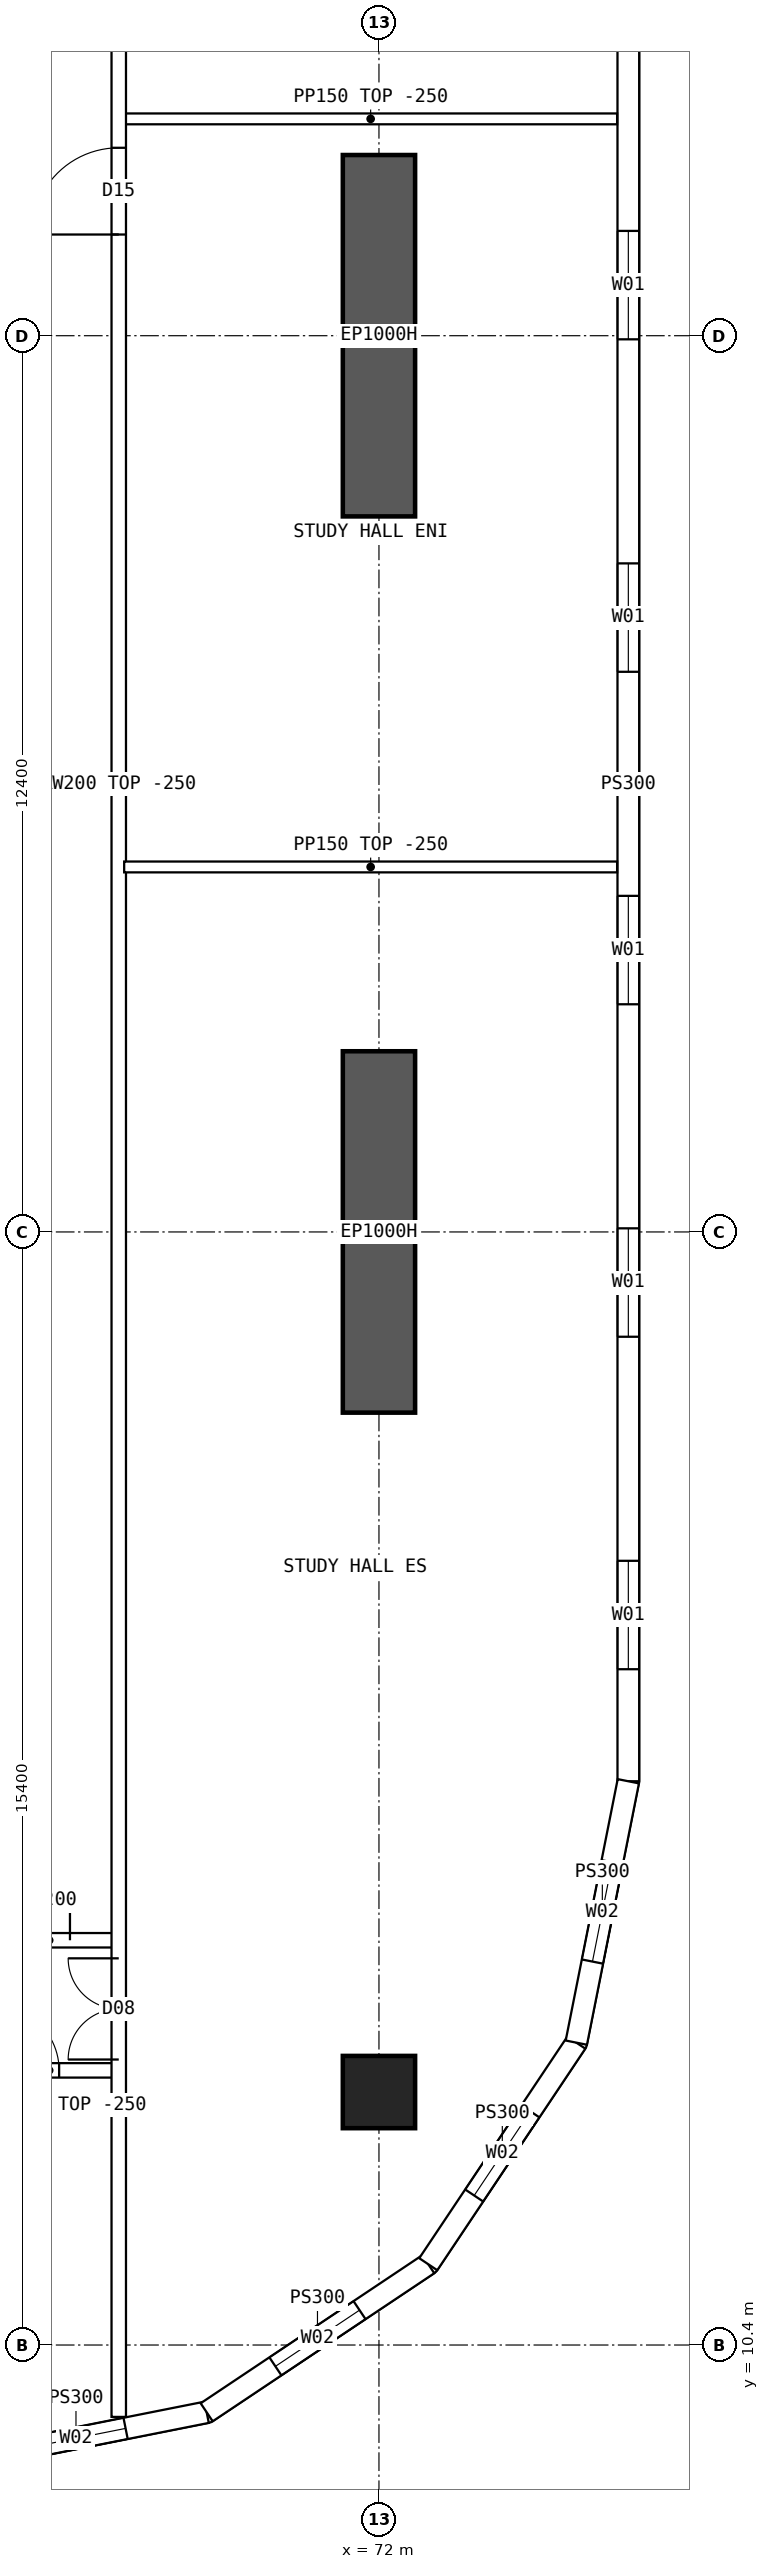
"""IFC4 building model, lengths in metres.
Left out: names, types, materials, properties, quantities, classifications, styles, units other than length and angle.
Written with IfcOpenShell. Run it as: python <this file> out.ifc"""

import sys

from ifc_helpers import new_model, si_unit, direction, frame, frame_2d, origin, origin_2d, place, context, subcontext, project, spatial, polyline, rectangle, hollow_rectangle, outline, extrude, element, fill, save


model = new_model("IFC4")
c1 = context("Model", 3, precision=1e-05, world=origin(), true_north=direction((0.0, 1.0)))
c2 = subcontext(c1, "Body", "Model", "MODEL_VIEW")
j1 = project(units=[si_unit("LENGTHUNIT", "METRE"), si_unit("PLANEANGLEUNIT", "RADIAN")], contexts=[c1])
p1 = place(None, origin())
s1 = spatial("IfcSite", under=j1, at=p1, CompositionType="ELEMENT")
p2 = place(p1, origin())
s2 = spatial("IfcBuilding", under=s1, at=p2, CompositionType="ELEMENT")
p3 = place(p2, frame((0.0, 0.0, 84.4)))
s3 = spatial("IfcBuildingStorey", under=s2, at=p3, CompositionType="ELEMENT", Elevation=84.4)
p4 = place(p3, frame((72.0, 13.9, 0.0), z_axis=(0.0, 0.0, 1.0), x_axis=(1.0, 0.0, 0.0)))
e1 = element("IfcColumn", 1, at=p4, inside=s3, PredefinedType="COLUMN", context=c2, shape_type="SweptSolid", body=[
    extrude(hollow_rectangle(XDim=1.0, YDim=1.0, WallThickness=0.1, at=origin_2d()), origin(), (0.0, 0.0, 1.0), 3.75),
])
for number, where, z_axis, x_axis in (
    (2, (72.0, 23.3, 0.0), (0.0, 0.0, 1.0), (0.0, 1.0, 0.0)),
    (3, (72.0, 35.7, 0.0), (0.0, 0.0, 1.0), (0.0, 1.0, 0.0)),
):
    element("IfcWall", number, at=place(p3, frame(where, z_axis=z_axis, x_axis=x_axis)), inside=s3, PredefinedType="SHEAR", context=c2, shape_type="SweptSolid", body=[
        extrude(rectangle(XDim=5.0, YDim=1.0, at=frame_2d((2.5, 0.0))), origin(), (0.0, 0.0, 1.0), 3.75),
    ])
p5 = place(p3, frame((75.45, 18.2, 0.0), z_axis=(0.0, 0.0, 1.0), x_axis=(0.0, 1.0, 0.0)))
e4 = element("IfcWall", 4, at=p5, inside=s3, PredefinedType="SOLIDWALL", context=c2, shape_type="SweptSolid", body=[
    extrude(outline(polyline([(-0.015, -0.15), (27.615, -0.15), (27.585, 0.15), (0.015, 0.15), (-0.015, -0.15)])), origin(), (0.0, 0.0, 1.0), 3.5),
])
p6 = place(p5, frame((1.55, 0.0, 0.9)))
e5 = element("IfcOpeningElement", 5, at=p6, cuts=e4, PredefinedType="OPENING", context=c2, shape_type="SweptSolid", body=[
    extrude(rectangle(XDim=1.5, YDim=2.0, at=frame_2d((0.75, 1.0))), frame((0.0, 0.16, 0.0), z_axis=(0.0, -1.0, 0.0), x_axis=(1.0, 0.0, 0.0)), (0.0, 0.0, 1.0), 0.32),
])
p7 = place(p5, frame((6.15, 0.0, 0.9)))
e6 = element("IfcOpeningElement", 6, at=p7, cuts=e4, PredefinedType="OPENING", context=c2, shape_type="SweptSolid", body=[
    extrude(rectangle(XDim=1.5, YDim=2.0, at=frame_2d((0.75, 1.0))), frame((0.0, 0.16, 0.0), z_axis=(0.0, -1.0, 0.0), x_axis=(1.0, 0.0, 0.0)), (0.0, 0.0, 1.0), 0.32),
])
p8 = place(p5, frame((10.75, 0.0, 0.9)))
e7 = element("IfcOpeningElement", 7, at=p8, cuts=e4, PredefinedType="OPENING", context=c2, shape_type="SweptSolid", body=[
    extrude(rectangle(XDim=1.5, YDim=2.0, at=frame_2d((0.75, 1.0))), frame((0.0, 0.16, 0.0), z_axis=(0.0, -1.0, 0.0), x_axis=(1.0, 0.0, 0.0)), (0.0, 0.0, 1.0), 0.32),
])
p9 = place(p5, frame((15.35, 0.0, 0.9)))
e8 = element("IfcOpeningElement", 8, at=p9, cuts=e4, PredefinedType="OPENING", context=c2, shape_type="SweptSolid", body=[
    extrude(rectangle(XDim=1.5, YDim=2.0, at=frame_2d((0.75, 1.0))), frame((0.0, 0.16, 0.0), z_axis=(0.0, -1.0, 0.0), x_axis=(1.0, 0.0, 0.0)), (0.0, 0.0, 1.0), 0.32),
])
p10 = place(p5, frame((19.95, 0.0, 0.9)))
e9 = element("IfcOpeningElement", 9, at=p10, cuts=e4, PredefinedType="OPENING", context=c2, shape_type="SweptSolid", body=[
    extrude(rectangle(XDim=1.5, YDim=2.0, at=frame_2d((0.75, 1.0))), frame((0.0, 0.16, 0.0), z_axis=(0.0, -1.0, 0.0), x_axis=(1.0, 0.0, 0.0)), (0.0, 0.0, 1.0), 0.32),
])
p11 = place(p5, frame((24.55, 0.0, 0.9)))
e10 = element("IfcOpeningElement", 10, at=p11, cuts=e4, PredefinedType="OPENING", context=c2, shape_type="SweptSolid", body=[
    extrude(rectangle(XDim=1.5, YDim=2.0, at=frame_2d((0.75, 1.0))), frame((0.0, 0.16, 0.0), z_axis=(0.0, -1.0, 0.0), x_axis=(1.0, 0.0, 0.0)), (0.0, 0.0, 1.0), 0.32),
])
p12 = place(p3, frame((66.0, 8.75, 0.0), z_axis=(0.0, 0.0, 1.0), x_axis=(0.980791473772, 0.195059183267, 0.0)))
e11 = element("IfcWall", 11, at=p12, inside=s3, PredefinedType="SOLIDWALL", context=c2, shape_type="SweptSolid", body=[
    extrude(outline(polyline([(-0.03, -0.15), (3.717, -0.15), (3.657, 0.15), (0.03, 0.15), (-0.03, -0.15)])), origin(), (0.0, 0.0, 1.0), 3.5),
])
p13 = place(p12, frame((1.144, 0.0, 0.9)))
e12 = element("IfcOpeningElement", 12, at=p13, cuts=e11, PredefinedType="OPENING", context=c2, shape_type="SweptSolid", body=[
    extrude(rectangle(XDim=1.4, YDim=1.8, at=frame_2d((0.7, 0.9))), frame((0.0, 0.16, 0.0), z_axis=(0.0, -1.0, 0.0), x_axis=(1.0, 0.0, 0.0)), (0.0, 0.0, 1.0), 0.32),
])
p14 = place(p3, frame((69.616, 9.469, 0.0), z_axis=(0.0, 0.0, 1.0), x_axis=(0.831448786846, 0.555601399253, 0.0)))
e13 = element("IfcWall", 13, at=p14, inside=s3, PredefinedType="SOLIDWALL", context=c2, shape_type="SweptSolid", body=[
    extrude(outline(polyline([(-0.03, -0.15), (3.717, -0.15), (3.657, 0.15), (0.03, 0.15), (-0.03, -0.15)])), origin(), (0.0, 0.0, 1.0), 3.5),
])
p15 = place(p14, frame((1.144, 0.0, 0.9)))
e14 = element("IfcOpeningElement", 14, at=p15, cuts=e13, PredefinedType="OPENING", context=c2, shape_type="SweptSolid", body=[
    extrude(rectangle(XDim=1.4, YDim=1.8, at=frame_2d((0.7, 0.9))), frame((0.0, 0.16, 0.0), z_axis=(0.0, -1.0, 0.0), x_axis=(1.0, 0.0, 0.0)), (0.0, 0.0, 1.0), 0.32),
])
p16 = place(p3, frame((72.682, 11.518, 0.0), z_axis=(0.0, 0.0, 1.0), x_axis=(0.555601399253, 0.831448786846, 0.0)))
e15 = element("IfcWall", 15, at=p16, inside=s3, PredefinedType="SOLIDWALL", context=c2, shape_type="SweptSolid", body=[
    extrude(outline(polyline([(-0.03, -0.15), (3.717, -0.15), (3.657, 0.15), (0.03, 0.15), (-0.03, -0.15)])), origin(), (0.0, 0.0, 1.0), 3.5),
])
p17 = place(p16, frame((1.144, 0.0, 0.9)))
e16 = element("IfcOpeningElement", 16, at=p17, cuts=e15, PredefinedType="OPENING", context=c2, shape_type="SweptSolid", body=[
    extrude(rectangle(XDim=1.4, YDim=1.8, at=frame_2d((0.7, 0.9))), frame((0.0, 0.16, 0.0), z_axis=(0.0, -1.0, 0.0), x_axis=(1.0, 0.0, 0.0)), (0.0, 0.0, 1.0), 0.32),
])
p18 = place(p3, frame((74.731, 14.583, 0.0), z_axis=(0.0, 0.0, 1.0), x_axis=(0.195059183267, 0.980791473772, 0.0)))
e17 = element("IfcWall", 17, at=p18, inside=s3, PredefinedType="SOLIDWALL", context=c2, shape_type="SweptSolid", body=[
    extrude(outline(polyline([(-0.03, -0.15), (3.702, -0.15), (3.672, 0.15), (0.03, 0.15), (-0.03, -0.15)])), origin(), (0.0, 0.0, 1.0), 3.5),
])
p19 = place(p18, frame((1.144, 0.0, 0.9)))
e18 = element("IfcOpeningElement", 18, at=p19, cuts=e17, PredefinedType="OPENING", context=c2, shape_type="SweptSolid", body=[
    extrude(rectangle(XDim=1.4, YDim=1.8, at=frame_2d((0.7, 0.9))), frame((0.0, 0.16, 0.0), z_axis=(0.0, -1.0, 0.0), x_axis=(1.0, 0.0, 0.0)), (0.0, 0.0, 1.0), 0.32),
])
p20 = place(p3, frame((66.475, 14.2, 0.0), z_axis=(0.0, 0.0, 1.0), x_axis=(1.0, 0.0, 0.0)))
e19 = element("IfcWall", 19, at=p20, inside=s3, PredefinedType="SOLIDWALL", context=c2, shape_type="SweptSolid", body=[
    extrude(rectangle(XDim=1.925, YDim=0.2, at=frame_2d((0.962, 0.0))), origin(), (0.0, 0.0, 1.0), 3.5),
])
p21 = place(p20, frame((0.2, 0.0, 0.0)))
e20 = element("IfcOpeningElement", 20, at=p21, cuts=e19, PredefinedType="OPENING", context=c2, shape_type="SweptSolid", body=[
    extrude(rectangle(XDim=0.9, YDim=2.1, at=frame_2d((0.45, 1.05))), frame((0.0, 0.11, 0.0), z_axis=(0.0, -1.0, 0.0), x_axis=(1.0, 0.0, 0.0)), (0.0, 0.0, 1.0), 0.22),
])
p22 = place(p3, frame((66.475, 16.0, 0.0), z_axis=(0.0, 0.0, 1.0), x_axis=(1.0, 0.0, 0.0)))
e21 = element("IfcWall", 21, at=p22, inside=s3, PredefinedType="SOLIDWALL", context=c2, shape_type="SweptSolid", body=[
    extrude(rectangle(XDim=1.925, YDim=0.2, at=frame_2d((0.962, 0.0))), origin(), (0.0, 0.0, 1.0), 3.5),
])
p23 = place(p22, frame((0.05, 0.0, 0.0)))
e22 = element("IfcOpeningElement", 22, at=p23, cuts=e21, PredefinedType="OPENING", context=c2, shape_type="SweptSolid", body=[
    extrude(rectangle(XDim=1.2, YDim=2.1, at=frame_2d((0.6, 1.05))), frame((0.0, 0.11, 0.0), z_axis=(0.0, -1.0, 0.0), x_axis=(1.0, 0.0, 0.0)), (0.0, 0.0, 1.0), 0.22),
])
p24 = place(p3, frame((68.475, 30.85, 0.0), z_axis=(0.0, 0.0, 1.0), x_axis=(1.0, 0.0, 0.0)))
e23 = element("IfcWall", 23, at=p24, inside=s3, PredefinedType="PARTITIONING", context=c2, shape_type="SweptSolid", body=[
    extrude(outline(polyline([(0.0, 0.0), (6.82, 0.0), (6.82, 3.5), (3.827, 3.5), (3.825, 3.05), (3.227, 3.05), (3.225, 3.5), (0.0, 3.5), (0.0, 0.0)])), frame((0.0, 0.075, 0.0), z_axis=(0.0, -1.0, 0.0), x_axis=(1.0, 0.0, 0.0)), (0.0, 0.0, 1.0), 0.15),
])
p25 = place(p3, frame((68.4, 9.405, 0.0), z_axis=(0.0, 0.0, 1.0), x_axis=(0.0, 1.0, 0.0)))
e24 = element("IfcWall", 24, at=p25, inside=s3, PredefinedType="SOLIDWALL", context=c2, shape_type="SweptSolid", body=[
    extrude(rectangle(XDim=45.189, YDim=0.2, at=frame_2d((22.595, 0.0))), origin(), (0.0, 0.0, 1.0), 3.5),
])
p26 = place(p25, frame((30.195, 0.0, 0.0)))
e25 = element("IfcOpeningElement", 25, at=p26, cuts=e24, PredefinedType="OPENING", context=c2, shape_type="SweptSolid", body=[
    extrude(rectangle(XDim=1.2, YDim=2.1, at=frame_2d((0.6, 1.05))), frame((0.0, 0.11, 0.0), z_axis=(0.0, -1.0, 0.0), x_axis=(1.0, 0.0, 0.0)), (0.0, 0.0, 1.0), 0.22),
])
p27 = place(p25, frame((4.945, 0.0, 0.0)))
e26 = element("IfcOpeningElement", 26, at=p27, cuts=e24, PredefinedType="OPENING", context=c2, shape_type="SweptSolid", body=[
    extrude(rectangle(XDim=1.4, YDim=2.1, at=frame_2d((0.7, 1.05))), frame((0.0, 0.11, 0.0), z_axis=(0.0, -1.0, 0.0), x_axis=(1.0, 0.0, 0.0)), (0.0, 0.0, 1.0), 0.22),
])
p28 = place(p25, frame((38.745, 0.0, 0.0)))
e27 = element("IfcOpeningElement", 27, at=p28, cuts=e24, PredefinedType="OPENING", context=c2, shape_type="SweptSolid", body=[
    extrude(rectangle(XDim=1.4, YDim=2.1, at=frame_2d((0.7, 1.05))), frame((0.0, 0.11, 0.0), z_axis=(0.0, -1.0, 0.0), x_axis=(1.0, 0.0, 0.0)), (0.0, 0.0, 1.0), 0.22),
])
p29 = place(p3, frame((68.475, 41.2, 0.0), z_axis=(0.0, 0.0, 1.0), x_axis=(1.0, 0.0, 0.0)))
e28 = element("IfcWall", 28, at=p29, inside=s3, PredefinedType="PARTITIONING", context=c2, shape_type="SweptSolid", body=[
    extrude(outline(polyline([(0.0, 0.0), (6.82, 0.0), (6.82, 3.5), (3.827, 3.5), (3.825, 3.05), (3.227, 3.05), (3.225, 3.5), (0.0, 3.5), (0.0, 0.0)])), frame((0.0, 0.075, 0.0), z_axis=(0.0, -1.0, 0.0), x_axis=(1.0, 0.0, 0.0)), (0.0, 0.0, 1.0), 0.15),
])
p30 = place(p6, origin())
e29 = element("IfcWindow", 29, at=p30, inside=s3, PartitioningType="SINGLE_PANEL", PredefinedType="WINDOW", context=c2, shape_type="SweptSolid", body=[
    extrude(rectangle(XDim=1.5, YDim=2.0, at=frame_2d((0.75, 1.0))), frame((0.0, 0.03, 0.0), z_axis=(0.0, -1.0, 0.0), x_axis=(1.0, 0.0, 0.0)), (0.0, 0.0, 1.0), 0.06),
])
fill(e5, e29)
p31 = place(p7, origin())
e30 = element("IfcWindow", 30, at=p31, inside=s3, PartitioningType="SINGLE_PANEL", PredefinedType="WINDOW", context=c2, shape_type="SweptSolid", body=[
    extrude(rectangle(XDim=1.5, YDim=2.0, at=frame_2d((0.75, 1.0))), frame((0.0, 0.03, 0.0), z_axis=(0.0, -1.0, 0.0), x_axis=(1.0, 0.0, 0.0)), (0.0, 0.0, 1.0), 0.06),
])
fill(e6, e30)
p32 = place(p8, origin())
e31 = element("IfcWindow", 31, at=p32, inside=s3, PartitioningType="SINGLE_PANEL", PredefinedType="WINDOW", context=c2, shape_type="SweptSolid", body=[
    extrude(rectangle(XDim=1.5, YDim=2.0, at=frame_2d((0.75, 1.0))), frame((0.0, 0.03, 0.0), z_axis=(0.0, -1.0, 0.0), x_axis=(1.0, 0.0, 0.0)), (0.0, 0.0, 1.0), 0.06),
])
fill(e7, e31)
p33 = place(p9, origin())
e32 = element("IfcWindow", 32, at=p33, inside=s3, PartitioningType="SINGLE_PANEL", PredefinedType="WINDOW", context=c2, shape_type="SweptSolid", body=[
    extrude(rectangle(XDim=1.5, YDim=2.0, at=frame_2d((0.75, 1.0))), frame((0.0, 0.03, 0.0), z_axis=(0.0, -1.0, 0.0), x_axis=(1.0, 0.0, 0.0)), (0.0, 0.0, 1.0), 0.06),
])
fill(e8, e32)
p34 = place(p10, origin())
e33 = element("IfcWindow", 33, at=p34, inside=s3, PartitioningType="SINGLE_PANEL", PredefinedType="WINDOW", context=c2, shape_type="SweptSolid", body=[
    extrude(rectangle(XDim=1.5, YDim=2.0, at=frame_2d((0.75, 1.0))), frame((0.0, 0.03, 0.0), z_axis=(0.0, -1.0, 0.0), x_axis=(1.0, 0.0, 0.0)), (0.0, 0.0, 1.0), 0.06),
])
fill(e9, e33)
p35 = place(p13, origin())
e34 = element("IfcWindow", 34, at=p35, inside=s3, PartitioningType="SINGLE_PANEL", PredefinedType="WINDOW", context=c2, shape_type="SweptSolid", body=[
    extrude(rectangle(XDim=1.4, YDim=1.8, at=frame_2d((0.7, 0.9))), frame((0.0, 0.03, 0.0), z_axis=(0.0, -1.0, 0.0), x_axis=(1.0, 0.0, 0.0)), (0.0, 0.0, 1.0), 0.06),
])
fill(e12, e34)
p36 = place(p15, origin())
e35 = element("IfcWindow", 35, at=p36, inside=s3, PartitioningType="SINGLE_PANEL", PredefinedType="WINDOW", context=c2, shape_type="SweptSolid", body=[
    extrude(rectangle(XDim=1.4, YDim=1.8, at=frame_2d((0.7, 0.9))), frame((0.0, 0.03, 0.0), z_axis=(0.0, -1.0, 0.0), x_axis=(1.0, 0.0, 0.0)), (0.0, 0.0, 1.0), 0.06),
])
fill(e14, e35)
p37 = place(p17, origin())
e36 = element("IfcWindow", 36, at=p37, inside=s3, PartitioningType="SINGLE_PANEL", PredefinedType="WINDOW", context=c2, shape_type="SweptSolid", body=[
    extrude(rectangle(XDim=1.4, YDim=1.8, at=frame_2d((0.7, 0.9))), frame((0.0, 0.03, 0.0), z_axis=(0.0, -1.0, 0.0), x_axis=(1.0, 0.0, 0.0)), (0.0, 0.0, 1.0), 0.06),
])
fill(e16, e36)
p38 = place(p19, origin())
e37 = element("IfcWindow", 37, at=p38, inside=s3, PartitioningType="SINGLE_PANEL", PredefinedType="WINDOW", context=c2, shape_type="SweptSolid", body=[
    extrude(rectangle(XDim=1.4, YDim=1.8, at=frame_2d((0.7, 0.9))), frame((0.0, 0.03, 0.0), z_axis=(0.0, -1.0, 0.0), x_axis=(1.0, 0.0, 0.0)), (0.0, 0.0, 1.0), 0.06),
])
fill(e18, e37)
p39 = place(p23, origin())
e38 = element("IfcDoor", 38, at=p39, inside=s3, OperationType="DOUBLE_DOOR_SINGLE_SWING", PredefinedType="DOOR", context=c2, shape_type="SweptSolid", body=[
    extrude(rectangle(XDim=1.2, YDim=2.1, at=frame_2d((0.6, 1.05))), frame((0.0, 0.025, 0.0), z_axis=(0.0, -1.0, 0.0), x_axis=(1.0, 0.0, 0.0)), (0.0, 0.0, 1.0), 0.05),
])
fill(e22, e38)
p40 = place(p26, origin())
e39 = element("IfcDoor", 39, at=p40, inside=s3, OperationType="SINGLE_SWING_LEFT", PredefinedType="DOOR", context=c2, shape_type="SweptSolid", body=[
    extrude(rectangle(XDim=1.2, YDim=2.1, at=frame_2d((0.6, 1.05))), frame((0.0, 0.025, 0.0), z_axis=(0.0, -1.0, 0.0), x_axis=(1.0, 0.0, 0.0)), (0.0, 0.0, 1.0), 0.05),
])
fill(e25, e39)
p41 = place(p27, origin())
e40 = element("IfcDoor", 40, at=p41, inside=s3, OperationType="DOUBLE_DOOR_SINGLE_SWING", PredefinedType="DOOR", context=c2, shape_type="SweptSolid", body=[
    extrude(rectangle(XDim=1.4, YDim=2.1, at=frame_2d((0.7, 1.05))), frame((0.0, 0.025, 0.0), z_axis=(0.0, -1.0, 0.0), x_axis=(1.0, 0.0, 0.0)), (0.0, 0.0, 1.0), 0.05),
])
fill(e26, e40)
p42 = place(p21, origin())
e41 = element("IfcDoor", 41, at=p42, inside=s3, OperationType="SINGLE_SWING_LEFT", PredefinedType="DOOR", context=c2, shape_type="SweptSolid", body=[
    extrude(rectangle(XDim=0.9, YDim=2.1, at=frame_2d((0.45, 1.05))), frame((0.0, 0.025, 0.0), z_axis=(0.0, -1.0, 0.0), x_axis=(1.0, 0.0, 0.0)), (0.0, 0.0, 1.0), 0.05),
])
fill(e20, e41)
save(model, sys.argv[1])
